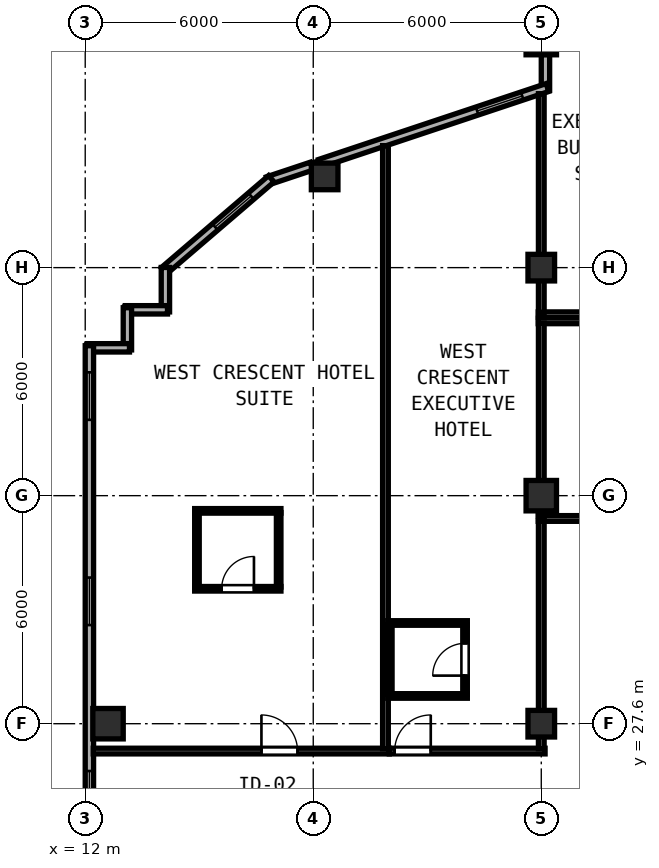
"""IFC4 building model, lengths in metres.
Left out: names, types, materials, properties, quantities, classifications, styles, units other than length and angle.
Written with IfcOpenShell. Run it as: python <this file> out.ifc"""

import sys

from ifc_helpers import new_model, si_unit, direction, frame, frame_2d, origin, origin_2d, place, context, subcontext, project, spatial, rectangle, hollow_rectangle, extrude, element, fill, save


model = new_model("IFC4")
c1 = context("Model", 3, precision=1e-05, world=origin(), true_north=direction((0.0, 1.0)))
c2 = subcontext(c1, "Body", "Model", "MODEL_VIEW")
j1 = project(units=[si_unit("LENGTHUNIT", "METRE"), si_unit("PLANEANGLEUNIT", "RADIAN")], contexts=[c1])
p1 = place(None, origin())
s1 = spatial("IfcSite", under=j1, at=p1, CompositionType="ELEMENT")
p2 = place(p1, origin())
s2 = spatial("IfcBuilding", under=s1, at=p2, CompositionType="ELEMENT")
p3 = place(p2, frame((0.0, 0.0, 239.05)))
s3 = spatial("IfcBuildingStorey", under=s2, at=p3, CompositionType="ELEMENT", Elevation=239.05)
for number, where, z_axis, x_axis in (
    (1, (24.0, 33.6, 0.0), (0.0, 0.0, 1.0), (1.0, 0.0, 0.0)),
    (2, (24.0, 45.6, 0.0), (0.0, 0.0, 1.0), (1.0, 0.0, 0.0)),
    (3, (12.6, 27.6, 0.0), (0.0, 0.0, 1.0), (1.0, 0.0, 0.0)),
):
    element("IfcColumn", number, at=place(p3, frame(where, z_axis=z_axis, x_axis=x_axis)), inside=s3, PredefinedType="COLUMN", context=c2, shape_type="SweptSolid", body=[
        extrude(hollow_rectangle(XDim=0.8, YDim=0.8, WallThickness=0.03, at=origin_2d()), origin(), (0.0, 0.0, 1.0), 3.85),
    ])
for number, where, z_axis, x_axis in (
    (4, (24.0, 27.6, 0.0), (0.0, 0.0, 1.0), (1.0, 0.0, 0.0)),
    (5, (24.0, 39.6, 0.0), (0.0, 0.0, 1.0), (1.0, 0.0, 0.0)),
    (6, (18.3, 42.0, 0.0), (0.0, 0.0, 1.0), (1.0, 0.0, 0.0)),
):
    element("IfcColumn", number, at=place(p3, frame(where, z_axis=z_axis, x_axis=x_axis)), inside=s3, PredefinedType="COLUMN", context=c2, shape_type="SweptSolid", body=[
        extrude(hollow_rectangle(XDim=0.7, YDim=0.7, WallThickness=0.026, at=origin_2d()), origin(), (0.0, 0.0, 1.0), 3.85),
    ])
p4 = place(p3, frame((24.11, 45.208, 0.0), z_axis=(0.0, 0.0, 1.0), x_axis=(0.0, -1.0, 0.0)))
e7 = element("IfcWall", 7, at=p4, inside=s3, PredefinedType="SOLIDWALL", context=c2, shape_type="SweptSolid", body=[
    extrude(rectangle(XDim=0.942, YDim=0.22, at=frame_2d((0.471, 0.0))), origin(), (0.0, 0.0, 1.0), 3.315),
])
p5 = place(p3, frame((24.162, 44.338, 0.0), z_axis=(0.0, 0.0, 1.0), x_axis=(-0.948687165594, -0.31621616315, 0.0)))
e8 = element("IfcWall", 8, at=p5, inside=s3, PredefinedType="SOLIDWALL", context=c2, shape_type="SweptSolid", body=[
    extrude(rectangle(XDim=6.312, YDim=0.22, at=frame_2d((3.156, 0.0))), origin(), (0.0, 0.0, 1.0), 3.315),
])
p6 = place(p5, frame((0.7, 0.0, 0.85)))
e9 = element("IfcOpeningElement", 9, at=p6, cuts=e8, PredefinedType="OPENING", context=c2, shape_type="SweptSolid", body=[
    extrude(rectangle(XDim=1.25, YDim=1.95, at=frame_2d((0.625, 0.975))), frame((0.0, 0.12, 0.0), z_axis=(0.0, -1.0, 0.0), x_axis=(1.0, 0.0, 0.0)), (0.0, 0.0, 1.0), 0.24),
])
p7 = place(p3, frame((17.958, 42.27, 0.0), z_axis=(0.0, 0.0, 1.0), x_axis=(-0.948683298051, -0.316227766017, 0.0)))
e10 = element("IfcWall", 10, at=p7, inside=s3, PredefinedType="SOLIDWALL", context=c2, shape_type="SweptSolid", body=[
    extrude(rectangle(XDim=1.218, YDim=0.22, at=frame_2d((0.609, 0.0))), origin(), (0.0, 0.0, 1.0), 3.67),
])
p8 = place(p3, frame((16.897, 41.938, 0.0), z_axis=(0.0, 0.0, 1.0), x_axis=(-0.759279729622, -0.650764390686, 0.0)))
e11 = element("IfcWall", 11, at=p8, inside=s3, PredefinedType="SOLIDWALL", context=c2, shape_type="SweptSolid", body=[
    extrude(rectangle(XDim=3.726, YDim=0.22, at=frame_2d((1.863, 0.0))), origin(), (0.0, 0.0, 1.0), 3.67),
])
p9 = place(p8, frame((0.7, 0.0, 0.85)))
e12 = element("IfcOpeningElement", 12, at=p9, cuts=e11, PredefinedType="OPENING", context=c2, shape_type="SweptSolid", body=[
    extrude(rectangle(XDim=1.25, YDim=1.95, at=frame_2d((0.625, 0.975))), frame((0.0, 0.12, 0.0), z_axis=(0.0, -1.0, 0.0), x_axis=(1.0, 0.0, 0.0)), (0.0, 0.0, 1.0), 0.24),
])
p10 = place(p3, frame((14.11, 39.604, 0.0), z_axis=(0.0, 0.0, 1.0), x_axis=(0.0, -1.0, 0.0)))
e13 = element("IfcWall", 13, at=p10, inside=s3, PredefinedType="SOLIDWALL", context=c2, shape_type="SweptSolid", body=[
    extrude(rectangle(XDim=1.169, YDim=0.22, at=frame_2d((0.585, 0.0))), origin(), (0.0, 0.0, 1.0), 3.67),
])
p11 = place(p3, frame((14.165, 38.49, 0.0), z_axis=(0.0, 0.0, 1.0), x_axis=(-1.0, 0.0, 0.0)))
e14 = element("IfcWall", 14, at=p11, inside=s3, PredefinedType="SOLIDWALL", context=c2, shape_type="SweptSolid", body=[
    extrude(rectangle(XDim=1.11, YDim=0.22, at=frame_2d((0.555, 0.0))), origin(), (0.0, 0.0, 1.0), 3.67),
])
p12 = place(p3, frame((13.11, 38.545, 0.0), z_axis=(0.0, 0.0, 1.0), x_axis=(0.0, -1.0, 0.0)))
e15 = element("IfcWall", 15, at=p12, inside=s3, PredefinedType="SOLIDWALL", context=c2, shape_type="SweptSolid", body=[
    extrude(rectangle(XDim=1.11, YDim=0.22, at=frame_2d((0.555, 0.0))), origin(), (0.0, 0.0, 1.0), 3.67),
])
p13 = place(p3, frame((13.165, 37.49, 0.0), z_axis=(0.0, 0.0, 1.0), x_axis=(-1.0, 0.0, 0.0)))
e16 = element("IfcWall", 16, at=p13, inside=s3, PredefinedType="SOLIDWALL", context=c2, shape_type="SweptSolid", body=[
    extrude(rectangle(XDim=1.11, YDim=0.22, at=frame_2d((0.555, 0.0))), origin(), (0.0, 0.0, 1.0), 3.67),
])
p14 = place(p3, frame((12.11, 37.545, 0.0), z_axis=(0.0, 0.0, 1.0), x_axis=(0.0, -1.0, 0.0)))
e17 = element("IfcWall", 17, at=p14, inside=s3, PredefinedType="SOLIDWALL", context=c2, shape_type="SweptSolid", body=[
    extrude(rectangle(XDim=21.145, YDim=0.22, at=frame_2d((10.573, 0.0))), origin(), (0.0, 0.0, 1.0), 3.67),
])
p15 = place(p14, frame((0.7, 0.0, 0.85)))
e18 = element("IfcOpeningElement", 18, at=p15, cuts=e17, PredefinedType="OPENING", context=c2, shape_type="SweptSolid", body=[
    extrude(rectangle(XDim=1.25, YDim=1.95, at=frame_2d((0.625, 0.975))), frame((0.0, 0.12, 0.0), z_axis=(0.0, -1.0, 0.0), x_axis=(1.0, 0.0, 0.0)), (0.0, 0.0, 1.0), 0.24),
])
p16 = place(p14, frame((6.1, 0.0, 0.85)))
e19 = element("IfcOpeningElement", 19, at=p16, cuts=e17, PredefinedType="OPENING", context=c2, shape_type="SweptSolid", body=[
    extrude(rectangle(XDim=1.25, YDim=1.95, at=frame_2d((0.625, 0.975))), frame((0.0, 0.12, 0.0), z_axis=(0.0, -1.0, 0.0), x_axis=(1.0, 0.0, 0.0)), (0.0, 0.0, 1.0), 0.24),
])
p17 = place(p14, frame((11.19, 0.0, 0.85)))
e20 = element("IfcOpeningElement", 20, at=p17, cuts=e17, PredefinedType="OPENING", context=c2, shape_type="SweptSolid", body=[
    extrude(rectangle(XDim=1.25, YDim=1.95, at=frame_2d((0.625, 0.975))), frame((0.0, 0.12, 0.0), z_axis=(0.0, -1.0, 0.0), x_axis=(1.0, 0.0, 0.0)), (0.0, 0.0, 1.0), 0.24),
])
p18 = place(p14, frame((16.9, 0.0, 0.85)))
e21 = element("IfcOpeningElement", 21, at=p18, cuts=e17, PredefinedType="OPENING", context=c2, shape_type="SweptSolid", body=[
    extrude(rectangle(XDim=1.25, YDim=1.95, at=frame_2d((0.625, 0.975))), frame((0.0, 0.12, 0.0), z_axis=(0.0, -1.0, 0.0), x_axis=(1.0, 0.0, 0.0)), (0.0, 0.0, 1.0), 0.24),
])
for number, where, z_axis, x_axis in (
    (22, (23.92, 38.2, 0.0), (0.0, 0.0, 1.0), (1.0, 0.0, 0.0)),
    (23, (23.92, 33.0, 0.0), (0.0, 0.0, 1.0), (1.0, 0.0, 0.0)),
):
    element("IfcWall", number, at=place(p3, frame(where, z_axis=z_axis, x_axis=x_axis)), inside=s3, PredefinedType="PARTITIONING", context=c2, shape_type="SweptSolid", body=[
        extrude(rectangle(XDim=4.04, YDim=0.15, at=frame_2d((2.02, 0.0))), origin(), (0.0, 0.0, 1.0), 3.67),
    ])
p19 = place(p3, frame((24.0, 33.06, 0.0), z_axis=(0.0, 0.0, 1.0), x_axis=(0.0, 1.0, 0.0)))
e24 = element("IfcWall", 24, at=p19, inside=s3, PredefinedType="PARTITIONING", context=c2, shape_type="SweptSolid", body=[
    extrude(rectangle(XDim=5.08, YDim=0.15, at=frame_2d((2.54, 0.0))), origin(), (0.0, 0.0, 1.0), 3.315),
])
p20 = place(p3, frame((23.92, 38.36, 0.0), z_axis=(0.0, 0.0, 1.0), x_axis=(1.0, 0.0, 0.0)))
e25 = element("IfcWall", 25, at=p20, inside=s3, PredefinedType="PARTITIONING", context=c2, shape_type="SweptSolid", body=[
    extrude(rectangle(XDim=4.04, YDim=0.15, at=frame_2d((2.02, 0.0))), origin(), (0.0, 0.0, 1.0), 3.67),
])
p21 = place(p3, frame((24.0, 38.42, 0.0), z_axis=(0.0, 0.0, 1.0), x_axis=(0.0, 1.0, 0.0)))
e26 = element("IfcWall", 26, at=p21, inside=s3, PredefinedType="PARTITIONING", context=c2, shape_type="SweptSolid", body=[
    extrude(rectangle(XDim=5.757, YDim=0.15, at=frame_2d((2.878, 0.0))), origin(), (0.0, 0.0, 1.0), 3.315),
])
p22 = place(p3, frame((12.212, 26.88, 0.0), z_axis=(0.0, 0.0, 1.0), x_axis=(1.0, 0.0, 0.0)))
e27 = element("IfcWall", 27, at=p22, inside=s3, PredefinedType="PARTITIONING", context=c2, shape_type="SweptSolid", body=[
    extrude(rectangle(XDim=7.788, YDim=0.15, at=frame_2d((3.894, 0.0))), origin(), (0.0, 0.0, 1.0), 3.67),
])
p23 = place(p22, frame((4.425, 0.0, 0.0)))
e28 = element("IfcOpeningElement", 28, at=p23, cuts=e27, PredefinedType="OPENING", context=c2, shape_type="SweptSolid", body=[
    extrude(rectangle(XDim=0.95, YDim=2.18, at=frame_2d((0.475, 1.09))), frame((0.0, 0.085, 0.0), z_axis=(0.0, -1.0, 0.0), x_axis=(1.0, 0.0, 0.0)), (0.0, 0.0, 1.0), 0.17),
])
p24 = place(p3, frame((19.9, 26.94, 0.0), z_axis=(0.0, 0.0, 1.0), x_axis=(0.0, 1.0, 0.0)))
e29 = element("IfcWall", 29, at=p24, inside=s3, PredefinedType="PARTITIONING", context=c2, shape_type="SweptSolid", body=[
    extrude(rectangle(XDim=15.87, YDim=0.15, at=frame_2d((7.935, 0.0))), origin(), (0.0, 0.0, 1.0), 3.67),
])
p25 = place(p3, frame((14.88, 33.2, 0.0), z_axis=(0.0, 0.0, 1.0), x_axis=(1.0, 0.0, 0.0)))
e30 = element("IfcWall", 30, at=p25, inside=s3, PredefinedType="PARTITIONING", context=c2, shape_type="SweptSolid", body=[
    extrude(rectangle(XDim=2.27, YDim=0.12, at=frame_2d((1.135, 0.0))), origin(), (0.0, 0.0, 1.0), 3.67),
])
p26 = place(p3, frame((14.88, 31.15, 0.0), z_axis=(0.0, 0.0, 1.0), x_axis=(1.0, 0.0, 0.0)))
e31 = element("IfcWall", 31, at=p26, inside=s3, PredefinedType="PARTITIONING", context=c2, shape_type="SweptSolid", body=[
    extrude(rectangle(XDim=2.27, YDim=0.12, at=frame_2d((1.135, 0.0))), origin(), (0.0, 0.0, 1.0), 3.67),
])
p27 = place(p26, frame((0.71, 0.0, 0.0)))
e32 = element("IfcOpeningElement", 32, at=p27, cuts=e31, PredefinedType="OPENING", context=c2, shape_type="SweptSolid", body=[
    extrude(rectangle(XDim=0.85, YDim=2.1, at=frame_2d((0.425, 1.05))), frame((0.0, 0.07, 0.0), z_axis=(0.0, -1.0, 0.0), x_axis=(1.0, 0.0, 0.0)), (0.0, 0.0, 1.0), 0.14),
])
for number, where, z_axis, x_axis in (
    (33, (14.94, 31.195, 0.0), (0.0, 0.0, 1.0), (0.0, 1.0, 0.0)),
    (34, (17.09, 31.195, 0.0), (0.0, 0.0, 1.0), (0.0, 1.0, 0.0)),
):
    element("IfcWall", number, at=place(p3, frame(where, z_axis=z_axis, x_axis=x_axis)), inside=s3, PredefinedType="PARTITIONING", context=c2, shape_type="SweptSolid", body=[
        extrude(rectangle(XDim=1.96, YDim=0.12, at=frame_2d((0.98, 0.0))), origin(), (0.0, 0.0, 1.0), 3.67),
    ])
p28 = place(p3, frame((20.002, 26.88, 0.0), z_axis=(0.0, 0.0, 1.0), x_axis=(1.0, 0.0, 0.0)))
e35 = element("IfcWall", 35, at=p28, inside=s3, PredefinedType="PARTITIONING", context=c2, shape_type="SweptSolid", body=[
    extrude(rectangle(XDim=4.098, YDim=0.15, at=frame_2d((2.049, 0.0))), origin(), (0.0, 0.0, 1.0), 3.67),
])
p29 = place(p28, frame((0.14, 0.0, 0.0)))
e36 = element("IfcOpeningElement", 36, at=p29, cuts=e35, PredefinedType="OPENING", context=c2, shape_type="SweptSolid", body=[
    extrude(rectangle(XDim=0.95, YDim=2.18, at=frame_2d((0.475, 1.09))), frame((0.0, 0.085, 0.0), z_axis=(0.0, -1.0, 0.0), x_axis=(1.0, 0.0, 0.0)), (0.0, 0.0, 1.0), 0.17),
])
p30 = place(p3, frame((24.0, 26.94, 0.0), z_axis=(0.0, 0.0, 1.0), x_axis=(0.0, 1.0, 0.0)))
e37 = element("IfcWall", 37, at=p30, inside=s3, PredefinedType="PARTITIONING", context=c2, shape_type="SweptSolid", body=[
    extrude(rectangle(XDim=6.0, YDim=0.15, at=frame_2d((3.0, 0.0))), origin(), (0.0, 0.0, 1.0), 3.315),
])
for number, where, z_axis, x_axis in (
    (38, (19.96, 30.25, 0.0), (0.0, 0.0, 1.0), (1.0, 0.0, 0.0)),
    (39, (19.96, 28.33, 0.0), (0.0, 0.0, 1.0), (1.0, 0.0, 0.0)),
):
    element("IfcWall", number, at=place(p3, frame(where, z_axis=z_axis, x_axis=x_axis)), inside=s3, PredefinedType="PARTITIONING", context=c2, shape_type="SweptSolid", body=[
        extrude(rectangle(XDim=2.094, YDim=0.12, at=frame_2d((1.047, 0.0))), origin(), (0.0, 0.0, 1.0), 3.67),
    ])
p31 = place(p3, frame((20.014, 28.375, 0.0), z_axis=(0.0, 0.0, 1.0), x_axis=(0.0, 1.0, 0.0)))
e40 = element("IfcWall", 40, at=p31, inside=s3, PredefinedType="PARTITIONING", context=c2, shape_type="SweptSolid", body=[
    extrude(rectangle(XDim=1.83, YDim=0.12, at=frame_2d((0.915, 0.0))), origin(), (0.0, 0.0, 1.0), 3.67),
])
p32 = place(p3, frame((21.994, 28.375, 0.0), z_axis=(0.0, 0.0, 1.0), x_axis=(0.0, 1.0, 0.0)))
e41 = element("IfcWall", 41, at=p32, inside=s3, PredefinedType="PARTITIONING", context=c2, shape_type="SweptSolid", body=[
    extrude(rectangle(XDim=1.83, YDim=0.12, at=frame_2d((0.915, 0.0))), origin(), (0.0, 0.0, 1.0), 3.67),
])
p33 = place(p32, frame((0.49, 0.0, 0.0)))
e42 = element("IfcOpeningElement", 42, at=p33, cuts=e41, PredefinedType="OPENING", context=c2, shape_type="SweptSolid", body=[
    extrude(rectangle(XDim=0.85, YDim=2.1, at=frame_2d((0.425, 1.05))), frame((0.0, 0.07, 0.0), z_axis=(0.0, -1.0, 0.0), x_axis=(1.0, 0.0, 0.0)), (0.0, 0.0, 1.0), 0.14),
])
p34 = place(p6, origin())
e43 = element("IfcWindow", 43, at=p34, inside=s3, PartitioningType="SINGLE_PANEL", PredefinedType="WINDOW", context=c2, shape_type="SweptSolid", body=[
    extrude(rectangle(XDim=1.25, YDim=1.95, at=frame_2d((0.625, 0.975))), frame((0.0, 0.03, 0.0), z_axis=(0.0, -1.0, 0.0), x_axis=(1.0, 0.0, 0.0)), (0.0, 0.0, 1.0), 0.06),
])
fill(e9, e43)
p35 = place(p9, origin())
e44 = element("IfcWindow", 44, at=p35, inside=s3, PartitioningType="SINGLE_PANEL", PredefinedType="WINDOW", context=c2, shape_type="SweptSolid", body=[
    extrude(rectangle(XDim=1.25, YDim=1.95, at=frame_2d((0.625, 0.975))), frame((0.0, 0.03, 0.0), z_axis=(0.0, -1.0, 0.0), x_axis=(1.0, 0.0, 0.0)), (0.0, 0.0, 1.0), 0.06),
])
fill(e12, e44)
p36 = place(p15, origin())
e45 = element("IfcWindow", 45, at=p36, inside=s3, PartitioningType="SINGLE_PANEL", PredefinedType="WINDOW", context=c2, shape_type="SweptSolid", body=[
    extrude(rectangle(XDim=1.25, YDim=1.95, at=frame_2d((0.625, 0.975))), frame((0.0, 0.03, 0.0), z_axis=(0.0, -1.0, 0.0), x_axis=(1.0, 0.0, 0.0)), (0.0, 0.0, 1.0), 0.06),
])
fill(e18, e45)
p37 = place(p16, origin())
e46 = element("IfcWindow", 46, at=p37, inside=s3, PartitioningType="SINGLE_PANEL", PredefinedType="WINDOW", context=c2, shape_type="SweptSolid", body=[
    extrude(rectangle(XDim=1.25, YDim=1.95, at=frame_2d((0.625, 0.975))), frame((0.0, 0.03, 0.0), z_axis=(0.0, -1.0, 0.0), x_axis=(1.0, 0.0, 0.0)), (0.0, 0.0, 1.0), 0.06),
])
fill(e19, e46)
p38 = place(p17, origin())
e47 = element("IfcWindow", 47, at=p38, inside=s3, PartitioningType="SINGLE_PANEL", PredefinedType="WINDOW", context=c2, shape_type="SweptSolid", body=[
    extrude(rectangle(XDim=1.25, YDim=1.95, at=frame_2d((0.625, 0.975))), frame((0.0, 0.03, 0.0), z_axis=(0.0, -1.0, 0.0), x_axis=(1.0, 0.0, 0.0)), (0.0, 0.0, 1.0), 0.06),
])
fill(e20, e47)
p39 = place(p23, origin())
e48 = element("IfcDoor", 48, at=p39, inside=s3, OperationType="SINGLE_SWING_LEFT", PredefinedType="DOOR", context=c2, shape_type="SweptSolid", body=[
    extrude(rectangle(XDim=0.95, YDim=2.18, at=frame_2d((0.475, 1.09))), frame((0.0, 0.025, 0.0), z_axis=(0.0, -1.0, 0.0), x_axis=(1.0, 0.0, 0.0)), (0.0, 0.0, 1.0), 0.05),
])
fill(e28, e48)
p40 = place(p27, origin())
e49 = element("IfcDoor", 49, at=p40, inside=s3, OperationType="SINGLE_SWING_RIGHT", PredefinedType="DOOR", context=c2, shape_type="SweptSolid", body=[
    extrude(rectangle(XDim=0.85, YDim=2.1, at=frame_2d((0.425, 1.05))), frame((0.0, 0.025, 0.0), z_axis=(0.0, -1.0, 0.0), x_axis=(1.0, 0.0, 0.0)), (0.0, 0.0, 1.0), 0.05),
])
fill(e32, e49)
p41 = place(p29, origin())
e50 = element("IfcDoor", 50, at=p41, inside=s3, OperationType="SINGLE_SWING_RIGHT", PredefinedType="DOOR", context=c2, shape_type="SweptSolid", body=[
    extrude(rectangle(XDim=0.95, YDim=2.18, at=frame_2d((0.475, 1.09))), frame((0.0, 0.025, 0.0), z_axis=(0.0, -1.0, 0.0), x_axis=(1.0, 0.0, 0.0)), (0.0, 0.0, 1.0), 0.05),
])
fill(e36, e50)
p42 = place(p33, origin())
e51 = element("IfcDoor", 51, at=p42, inside=s3, OperationType="SINGLE_SWING_LEFT", PredefinedType="DOOR", context=c2, shape_type="SweptSolid", body=[
    extrude(rectangle(XDim=0.85, YDim=2.1, at=frame_2d((0.425, 1.05))), frame((0.0, 0.025, 0.0), z_axis=(0.0, -1.0, 0.0), x_axis=(1.0, 0.0, 0.0)), (0.0, 0.0, 1.0), 0.05),
])
fill(e42, e51)
save(model, sys.argv[1])
